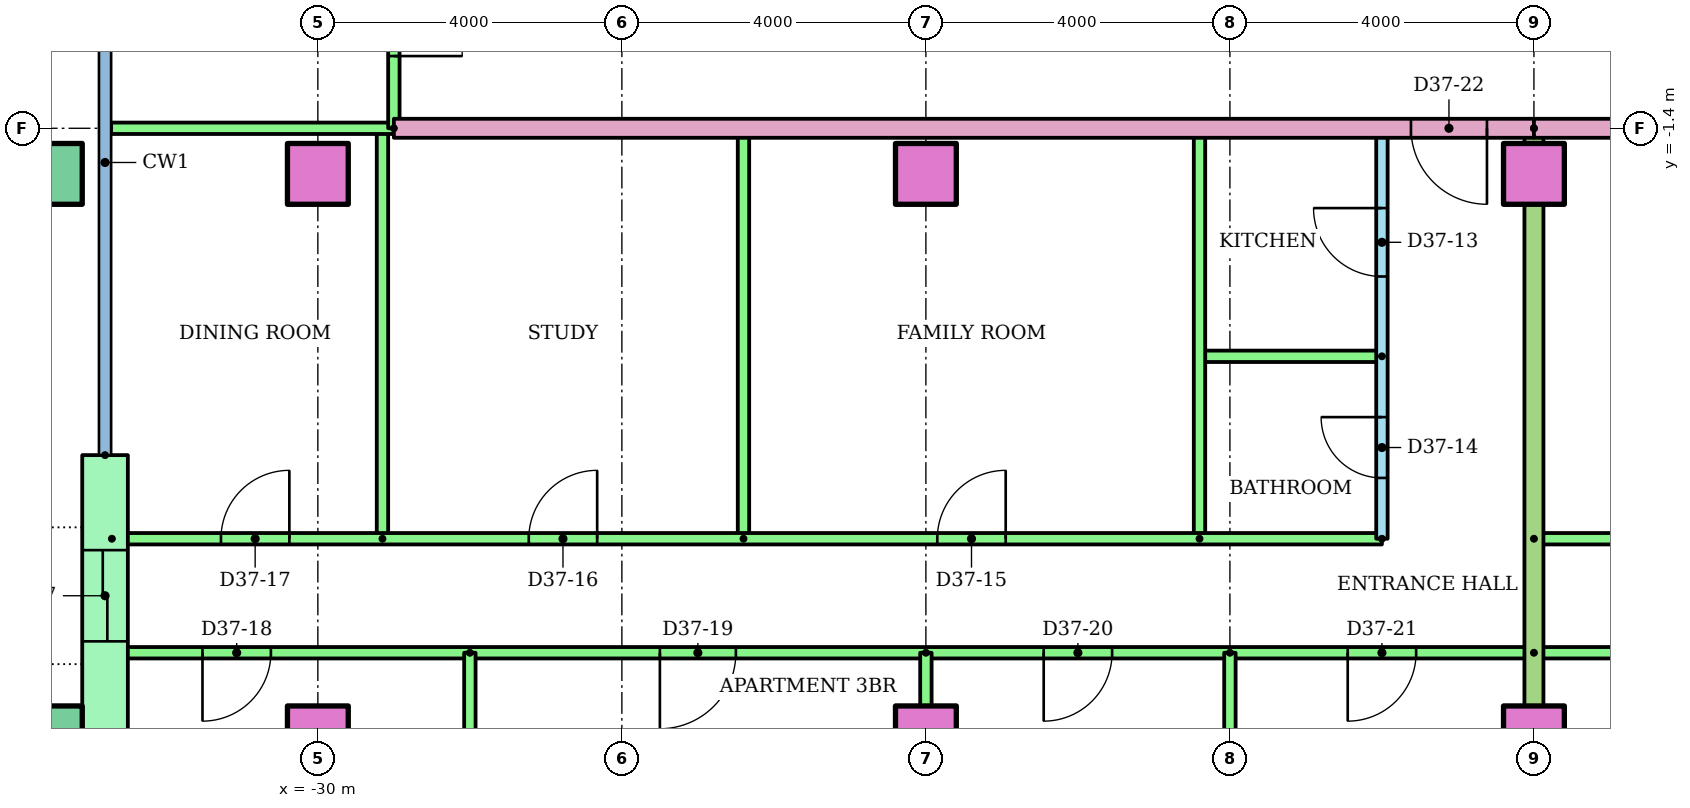
"""IFC4 building model, lengths in metres.
Left out: names, types, materials, properties, quantities, classifications, styles, units other than length and angle.
Written with IfcOpenShell. Run it as: python <this file> out.ifc"""

import sys

from ifc_helpers import new_model, si_unit, direction, frame, frame_2d, origin, origin_2d, place, context, subcontext, project, spatial, rectangle, hollow_rectangle, extrude, element, fill, save


model = new_model("IFC4")
c1 = context("Model", 3, precision=1e-05, world=origin(), true_north=direction((0.0, 1.0)))
c2 = subcontext(c1, "Body", "Model", "MODEL_VIEW")
j1 = project(units=[si_unit("LENGTHUNIT", "METRE"), si_unit("PLANEANGLEUNIT", "RADIAN")], contexts=[c1])
p1 = place(None, origin())
s1 = spatial("IfcSite", under=j1, at=p1, CompositionType="ELEMENT")
p2 = place(p1, origin())
s2 = spatial("IfcBuilding", under=s1, at=p2, CompositionType="ELEMENT")
p3 = place(p2, frame((0.0, 0.0, 142.2)))
s3 = spatial("IfcBuildingStorey", under=s2, at=p3, CompositionType="ELEMENT", Elevation=142.2)
p4 = place(p3, frame((-33.5, -9.4, 0.0)))
e1 = element("IfcColumn", 1, at=p4, inside=s3, PredefinedType="COLUMN", context=c2, shape_type="SweptSolid", body=[
    extrude(hollow_rectangle(XDim=0.8, YDim=0.8, WallThickness=0.04, at=origin_2d()), origin(), (0.0, 0.0, 1.0), 3.2),
])
for number, where in (
    (2, (-30.0, -9.4, 0.0)),
    (3, (-22.0, -9.4, 0.0)),
    (4, (-14.0, -9.4, 0.0)),
):
    element("IfcColumn", number, at=place(p3, frame(where)), inside=s3, PredefinedType="COLUMN", context=c2, shape_type="SweptSolid", body=[
        extrude(rectangle(XDim=0.8, YDim=0.8, at=origin_2d()), origin(), (0.0, 0.0, 1.0), 3.2),
    ])
p5 = place(p3, frame((-33.5, -2.0, 0.0)))
e5 = element("IfcColumn", 5, at=p5, inside=s3, PredefinedType="COLUMN", context=c2, shape_type="SweptSolid", body=[
    extrude(hollow_rectangle(XDim=0.8, YDim=0.8, WallThickness=0.04, at=origin_2d()), origin(), (0.0, 0.0, 1.0), 3.2),
])
for number, where in (
    (6, (-30.0, -2.0, 0.0)),
    (7, (-22.0, -2.0, 0.0)),
    (8, (-14.0, -2.0, 0.0)),
):
    element("IfcColumn", number, at=place(p3, frame(where)), inside=s3, PredefinedType="COLUMN", context=c2, shape_type="SweptSolid", body=[
        extrude(rectangle(XDim=0.8, YDim=0.8, at=origin_2d()), origin(), (0.0, 0.0, 1.0), 3.2),
    ])
p6 = place(p3, frame((-32.8, -5.7, 0.0), z_axis=(0.0, 0.0, 1.0), x_axis=(0.0, -1.0, 0.0)))
e9 = element("IfcWall", 9, at=p6, inside=s3, PredefinedType="STANDARD", context=c2, shape_type="SweptSolid", body=[
    extrude(rectangle(XDim=3.7, YDim=0.6, at=frame_2d((1.85, 0.0))), origin(), (0.0, 0.0, 1.0), 2.92),
])
p7 = place(p6, frame((1.25, 0.0, 0.0)))
e10 = element("IfcOpeningElement", 10, at=p7, cuts=e9, PredefinedType="OPENING", context=c2, shape_type="SweptSolid", body=[
    extrude(rectangle(XDim=1.2, YDim=2.1, at=frame_2d((0.6, 1.05))), frame((0.0, 0.31, 0.0), z_axis=(0.0, -1.0, 0.0), x_axis=(1.0, 0.0, 0.0)), (0.0, 0.0, 1.0), 0.62),
])
p8 = place(p3, frame((-16.0, -6.8, 0.0), z_axis=(0.0, 0.0, 1.0), x_axis=(0.0, 1.0, 0.0)))
e11 = element("IfcWall", 11, at=p8, inside=s3, PredefinedType="PARTITIONING", context=c2, shape_type="SweptSolid", body=[
    extrude(rectangle(XDim=5.4, YDim=0.15, at=frame_2d((2.7, 0.0))), origin(), (0.0, 0.0, 1.0), 2.4),
])
p9 = place(p8, frame((3.45, 0.0, 0.0)))
e12 = element("IfcOpeningElement", 12, at=p9, cuts=e11, PredefinedType="OPENING", context=c2, shape_type="SweptSolid", body=[
    extrude(rectangle(XDim=0.9, YDim=2.1, at=frame_2d((0.45, 1.05))), frame((0.0, 0.085, 0.0), z_axis=(0.0, -1.0, 0.0), x_axis=(1.0, 0.0, 0.0)), (0.0, 0.0, 1.0), 0.17),
])
p10 = place(p8, frame((0.8, 0.0, 0.0)))
e13 = element("IfcOpeningElement", 13, at=p10, cuts=e11, PredefinedType="OPENING", context=c2, shape_type="SweptSolid", body=[
    extrude(rectangle(XDim=0.8, YDim=2.1, at=frame_2d((0.4, 1.05))), frame((0.0, 0.085, 0.0), z_axis=(0.0, -1.0, 0.0), x_axis=(1.0, 0.0, 0.0)), (0.0, 0.0, 1.0), 0.17),
])
p11 = place(p3, frame((-16.0, -4.4, 0.0), z_axis=(0.0, 0.0, 1.0), x_axis=(-1.0, 0.0, 0.0)))
e14 = element("IfcWall", 14, at=p11, inside=s3, PredefinedType="PARTITIONING", context=c2, shape_type="SweptSolid", body=[
    extrude(rectangle(XDim=2.4, YDim=0.15, at=frame_2d((1.2, 0.0))), origin(), (0.0, 0.0, 1.0), 2.4),
])
for number, where, z_axis, x_axis in (
    (15, (-18.4, -6.8, 0.0), (0.0, 0.0, 1.0), (0.0, 1.0, 0.0)),
    (16, (-24.4, -6.8, 0.0), (0.0, 0.0, 1.0), (0.0, 1.0, 0.0)),
    (17, (-29.15, -6.8, 0.0), (0.0, 0.0, 1.0), (0.0, 1.0, 0.0)),
):
    element("IfcWall", number, at=place(p3, frame(where, z_axis=z_axis, x_axis=x_axis)), inside=s3, PredefinedType="PARTITIONING", context=c2, shape_type="SweptSolid", body=[
        extrude(rectangle(XDim=5.4, YDim=0.15, at=frame_2d((2.7, 0.0))), origin(), (0.0, 0.0, 1.0), 2.4),
    ])
p12 = place(p3, frame((-32.71, -6.8, 0.0)))
e18 = element("IfcWall", 18, at=p12, inside=s3, PredefinedType="PARTITIONING", context=c2, shape_type="SweptSolid", body=[
    extrude(rectangle(XDim=16.71, YDim=0.15, at=frame_2d((8.355, 0.0))), origin(), (0.0, 0.0, 1.0), 2.4),
])
p13 = place(p12, frame((10.86, 0.0, 0.0)))
e19 = element("IfcOpeningElement", 19, at=p13, cuts=e18, PredefinedType="OPENING", context=c2, shape_type="SweptSolid", body=[
    extrude(rectangle(XDim=0.9, YDim=2.1, at=frame_2d((0.45, 1.05))), frame((0.0, 0.085, 0.0), z_axis=(0.0, -1.0, 0.0), x_axis=(1.0, 0.0, 0.0)), (0.0, 0.0, 1.0), 0.17),
])
p14 = place(p12, frame((5.485, 0.0, 0.0)))
e20 = element("IfcOpeningElement", 20, at=p14, cuts=e18, PredefinedType="OPENING", context=c2, shape_type="SweptSolid", body=[
    extrude(rectangle(XDim=0.9, YDim=2.1, at=frame_2d((0.45, 1.05))), frame((0.0, 0.085, 0.0), z_axis=(0.0, -1.0, 0.0), x_axis=(1.0, 0.0, 0.0)), (0.0, 0.0, 1.0), 0.17),
])
p15 = place(p12, frame((1.435, 0.0, 0.0)))
e21 = element("IfcOpeningElement", 21, at=p15, cuts=e18, PredefinedType="OPENING", context=c2, shape_type="SweptSolid", body=[
    extrude(rectangle(XDim=0.9, YDim=2.1, at=frame_2d((0.45, 1.05))), frame((0.0, 0.085, 0.0), z_axis=(0.0, -1.0, 0.0), x_axis=(1.0, 0.0, 0.0)), (0.0, 0.0, 1.0), 0.17),
])
p16 = place(p3, frame((-14.0, -8.3, 0.0), z_axis=(0.0, 0.0, 1.0), x_axis=(-1.0, 0.0, 0.0)))
e22 = element("IfcWall", 22, at=p16, inside=s3, PredefinedType="PARTITIONING", context=c2, shape_type="SweptSolid", body=[
    extrude(rectangle(XDim=18.71, YDim=0.15, at=frame_2d((9.355, 0.0))), origin(), (0.0, 0.0, 1.0), 2.4),
])
p17 = place(p16, frame((16.618, 0.0, 0.0)))
e23 = element("IfcOpeningElement", 23, at=p17, cuts=e22, PredefinedType="OPENING", context=c2, shape_type="SweptSolid", body=[
    extrude(rectangle(XDim=0.9, YDim=2.1, at=frame_2d((0.45, 1.05))), frame((0.0, 0.085, 0.0), z_axis=(0.0, -1.0, 0.0), x_axis=(1.0, 0.0, 0.0)), (0.0, 0.0, 1.0), 0.17),
])
p18 = place(p16, frame((10.5, 0.0, 0.0)))
e24 = element("IfcOpeningElement", 24, at=p18, cuts=e22, PredefinedType="OPENING", context=c2, shape_type="SweptSolid", body=[
    extrude(rectangle(XDim=1.0, YDim=2.1, at=frame_2d((0.5, 1.05))), frame((0.0, 0.085, 0.0), z_axis=(0.0, -1.0, 0.0), x_axis=(1.0, 0.0, 0.0)), (0.0, 0.0, 1.0), 0.17),
])
p19 = place(p16, frame((5.55, 0.0, 0.0)))
e25 = element("IfcOpeningElement", 25, at=p19, cuts=e22, PredefinedType="OPENING", context=c2, shape_type="SweptSolid", body=[
    extrude(rectangle(XDim=0.9, YDim=2.1, at=frame_2d((0.45, 1.05))), frame((0.0, 0.085, 0.0), z_axis=(0.0, -1.0, 0.0), x_axis=(1.0, 0.0, 0.0)), (0.0, 0.0, 1.0), 0.17),
])
p20 = place(p16, frame((1.55, 0.0, 0.0)))
e26 = element("IfcOpeningElement", 26, at=p20, cuts=e22, PredefinedType="OPENING", context=c2, shape_type="SweptSolid", body=[
    extrude(rectangle(XDim=0.9, YDim=2.1, at=frame_2d((0.45, 1.05))), frame((0.0, 0.085, 0.0), z_axis=(0.0, -1.0, 0.0), x_axis=(1.0, 0.0, 0.0)), (0.0, 0.0, 1.0), 0.17),
])
p21 = place(p3, frame((-28.0, -8.3, 0.0), z_axis=(0.0, 0.0, 1.0), x_axis=(0.0, -1.0, 0.0)))
e27 = element("IfcWall", 27, at=p21, inside=s3, PredefinedType="PARTITIONING", context=c2, shape_type="SweptSolid", body=[
    extrude(rectangle(XDim=6.22, YDim=0.15, at=frame_2d((3.11, 0.0))), origin(), (0.0, 0.0, 1.0), 2.4),
])
p22 = place(p3, frame((-22.0, -8.3, 0.0), z_axis=(0.0, 0.0, 1.0), x_axis=(0.0, -1.0, 0.0)))
e28 = element("IfcWall", 28, at=p22, inside=s3, PredefinedType="PARTITIONING", context=c2, shape_type="SweptSolid", body=[
    extrude(rectangle(XDim=8.01, YDim=0.15, at=frame_2d((4.005, 0.0))), origin(), (0.0, 0.0, 1.0), 2.4),
])
p23 = place(p3, frame((-18.0, -8.3, 0.0), z_axis=(0.0, 0.0, 1.0), x_axis=(0.0, -1.0, 0.0)))
e29 = element("IfcWall", 29, at=p23, inside=s3, PredefinedType="PARTITIONING", context=c2, shape_type="SweptSolid", body=[
    extrude(rectangle(XDim=8.021, YDim=0.15, at=frame_2d((4.01, 0.0))), origin(), (0.0, 0.0, 1.0), 2.4),
])
p24 = place(p3, frame((-14.0, -6.8, 0.0)))
e30 = element("IfcWall", 30, at=p24, inside=s3, PredefinedType="PARTITIONING", context=c2, shape_type="SweptSolid", body=[
    extrude(rectangle(XDim=22.0, YDim=0.15, at=frame_2d((11.0, 0.0))), origin(), (0.0, 0.0, 1.0), 2.4),
])
p25 = place(p24, frame((15.025, 0.0, 0.0)))
e31 = element("IfcOpeningElement", 31, at=p25, cuts=e30, PredefinedType="OPENING", context=c2, shape_type="SweptSolid", body=[
    extrude(rectangle(XDim=0.9, YDim=2.1, at=frame_2d((0.45, 1.05))), frame((0.0, 0.085, 0.0), z_axis=(0.0, -1.0, 0.0), x_axis=(1.0, 0.0, 0.0)), (0.0, 0.0, 1.0), 0.17),
])
p26 = place(p24, frame((7.65, 0.0, 0.0)))
e32 = element("IfcOpeningElement", 32, at=p26, cuts=e30, PredefinedType="OPENING", context=c2, shape_type="SweptSolid", body=[
    extrude(rectangle(XDim=0.9, YDim=2.1, at=frame_2d((0.45, 1.05))), frame((0.0, 0.085, 0.0), z_axis=(0.0, -1.0, 0.0), x_axis=(1.0, 0.0, 0.0)), (0.0, 0.0, 1.0), 0.17),
])
p27 = place(p24, frame((1.975, 0.0, 0.0)))
e33 = element("IfcOpeningElement", 33, at=p27, cuts=e30, PredefinedType="OPENING", context=c2, shape_type="SweptSolid", body=[
    extrude(rectangle(XDim=0.9, YDim=2.1, at=frame_2d((0.45, 1.05))), frame((0.0, 0.085, 0.0), z_axis=(0.0, -1.0, 0.0), x_axis=(1.0, 0.0, 0.0)), (0.0, 0.0, 1.0), 0.17),
])
p28 = place(p3, frame((10.0, -8.3, 0.0), z_axis=(0.0, 0.0, 1.0), x_axis=(-1.0, 0.0, 0.0)))
e34 = element("IfcWall", 34, at=p28, inside=s3, PredefinedType="PARTITIONING", context=c2, shape_type="SweptSolid", body=[
    extrude(rectangle(XDim=24.0, YDim=0.15, at=frame_2d((12.0, 0.0))), origin(), (0.0, 0.0, 1.0), 2.4),
])
p29 = place(p28, frame((19.5, 0.0, 0.0)))
e35 = element("IfcOpeningElement", 35, at=p29, cuts=e34, PredefinedType="OPENING", context=c2, shape_type="SweptSolid", body=[
    extrude(rectangle(XDim=1.0, YDim=2.1, at=frame_2d((0.5, 1.05))), frame((0.0, 0.085, 0.0), z_axis=(0.0, -1.0, 0.0), x_axis=(1.0, 0.0, 0.0)), (0.0, 0.0, 1.0), 0.17),
])
p30 = place(p28, frame((13.55, 0.0, 0.0)))
e36 = element("IfcOpeningElement", 36, at=p30, cuts=e34, PredefinedType="OPENING", context=c2, shape_type="SweptSolid", body=[
    extrude(rectangle(XDim=0.9, YDim=2.1, at=frame_2d((0.45, 1.05))), frame((0.0, 0.085, 0.0), z_axis=(0.0, -1.0, 0.0), x_axis=(1.0, 0.0, 0.0)), (0.0, 0.0, 1.0), 0.17),
])
p31 = place(p28, frame((9.55, 0.0, 0.0)))
e37 = element("IfcOpeningElement", 37, at=p31, cuts=e34, PredefinedType="OPENING", context=c2, shape_type="SweptSolid", body=[
    extrude(rectangle(XDim=0.9, YDim=2.1, at=frame_2d((0.45, 1.05))), frame((0.0, 0.085, 0.0), z_axis=(0.0, -1.0, 0.0), x_axis=(1.0, 0.0, 0.0)), (0.0, 0.0, 1.0), 0.17),
])
p32 = place(p28, frame((5.55, 0.0, 0.0)))
e38 = element("IfcOpeningElement", 38, at=p32, cuts=e34, PredefinedType="OPENING", context=c2, shape_type="SweptSolid", body=[
    extrude(rectangle(XDim=0.9, YDim=2.1, at=frame_2d((0.45, 1.05))), frame((0.0, 0.085, 0.0), z_axis=(0.0, -1.0, 0.0), x_axis=(1.0, 0.0, 0.0)), (0.0, 0.0, 1.0), 0.17),
])
p33 = place(p28, frame((1.55, 0.0, 0.0)))
e39 = element("IfcOpeningElement", 39, at=p33, cuts=e34, PredefinedType="OPENING", context=c2, shape_type="SweptSolid", body=[
    extrude(rectangle(XDim=0.9, YDim=2.1, at=frame_2d((0.45, 1.05))), frame((0.0, 0.085, 0.0), z_axis=(0.0, -1.0, 0.0), x_axis=(1.0, 0.0, 0.0)), (0.0, 0.0, 1.0), 0.17),
])
p34 = place(p3, frame((-14.0, -1.4, 0.0), z_axis=(0.0, 0.0, 1.0), x_axis=(0.0, -1.0, 0.0)))
e40 = element("IfcWall", 40, at=p34, inside=s3, PredefinedType="PARTITIONING", context=c2, shape_type="SweptSolid", body=[
    extrude(rectangle(XDim=14.91, YDim=0.25, at=frame_2d((7.455, 0.0))), origin(), (0.0, 0.0, 1.0), 2.4),
])
p35 = place(p3, frame((-14.0, -1.4, 0.0), z_axis=(0.0, 0.0, 1.0), x_axis=(-1.0, 0.0, 0.0)))
e41 = element("IfcWall", 41, at=p35, inside=s3, PredefinedType="PARTITIONING", context=c2, shape_type="SweptSolid", body=[
    extrude(rectangle(XDim=15.0, YDim=0.25, at=frame_2d((7.5, 0.0))), origin(), (0.0, 0.0, 1.0), 2.4),
])
p36 = place(p35, frame((0.618, 0.0, 0.0)))
e42 = element("IfcOpeningElement", 42, at=p36, cuts=e41, PredefinedType="OPENING", context=c2, shape_type="SweptSolid", body=[
    extrude(rectangle(XDim=1.0, YDim=2.1, at=frame_2d((0.5, 1.05))), frame((0.0, 0.135, 0.0), z_axis=(0.0, -1.0, 0.0), x_axis=(1.0, 0.0, 0.0)), (0.0, 0.0, 1.0), 0.27),
])
p37 = place(p3, frame((-29.0, -1.4, 0.0), z_axis=(0.0, 0.0, 1.0), x_axis=(-1.0, 0.0, 0.0)))
e43 = element("IfcWall", 43, at=p37, inside=s3, PredefinedType="PARTITIONING", context=c2, shape_type="SweptSolid", body=[
    extrude(rectangle(XDim=3.72, YDim=0.15, at=frame_2d((1.86, 0.0))), origin(), (0.0, 0.0, 1.0), 2.4),
])
p38 = place(p3, frame((-29.0, 1.4, 0.0), z_axis=(0.0, 0.0, 1.0), x_axis=(0.0, -1.0, 0.0)))
e44 = element("IfcWall", 44, at=p38, inside=s3, PredefinedType="PARTITIONING", context=c2, shape_type="SweptSolid", body=[
    extrude(rectangle(XDim=2.8, YDim=0.15, at=frame_2d((1.4, 0.0))), origin(), (0.0, 0.0, 1.0), 2.4),
])
p39 = place(p38, frame((0.95, 0.0, 0.0)))
e45 = element("IfcOpeningElement", 45, at=p39, cuts=e44, PredefinedType="OPENING", context=c2, shape_type="SweptSolid", body=[
    extrude(rectangle(XDim=0.9, YDim=2.1, at=frame_2d((0.45, 1.05))), frame((0.0, 0.085, 0.0), z_axis=(0.0, -1.0, 0.0), x_axis=(1.0, 0.0, 0.0)), (0.0, 0.0, 1.0), 0.17),
])
p40 = place(p3, frame((14.0, -1.4, 0.0), z_axis=(0.0, 0.0, 1.0), x_axis=(-1.0, 0.0, 0.0)))
e46 = element("IfcWall", 46, at=p40, inside=s3, PredefinedType="PARTITIONING", context=c2, shape_type="SweptSolid", body=[
    extrude(rectangle(XDim=28.0, YDim=0.25, at=frame_2d((14.0, 0.0))), origin(), (0.0, 0.0, 1.0), 2.4),
])
p41 = place(p40, frame((4.618, 0.0, 0.0)))
e47 = element("IfcOpeningElement", 47, at=p41, cuts=e46, PredefinedType="OPENING", context=c2, shape_type="SweptSolid", body=[
    extrude(rectangle(XDim=1.0, YDim=2.1, at=frame_2d((0.5, 1.05))), frame((0.0, 0.135, 0.0), z_axis=(0.0, -1.0, 0.0), x_axis=(1.0, 0.0, 0.0)), (0.0, 0.0, 1.0), 0.27),
])
p42 = place(p40, frame((2.382, 0.0, 0.0)))
e48 = element("IfcOpeningElement", 48, at=p42, cuts=e46, PredefinedType="OPENING", context=c2, shape_type="SweptSolid", body=[
    extrude(rectangle(XDim=1.0, YDim=2.1, at=frame_2d((0.5, 1.05))), frame((0.0, 0.135, 0.0), z_axis=(0.0, -1.0, 0.0), x_axis=(1.0, 0.0, 0.0)), (0.0, 0.0, 1.0), 0.27),
])
p43 = place(p9, origin())
e49 = element("IfcDoor", 49, at=p43, inside=s3, OperationType="SINGLE_SWING_RIGHT", PredefinedType="DOOR", context=c2, shape_type="SweptSolid", body=[
    extrude(rectangle(XDim=0.9, YDim=2.1, at=frame_2d((0.45, 1.05))), frame((0.0, 0.025, 0.0), z_axis=(0.0, -1.0, 0.0), x_axis=(1.0, 0.0, 0.0)), (0.0, 0.0, 1.0), 0.05),
])
fill(e12, e49)
p44 = place(p10, origin())
e50 = element("IfcDoor", 50, at=p44, inside=s3, OperationType="SINGLE_SWING_RIGHT", PredefinedType="DOOR", context=c2, shape_type="SweptSolid", body=[
    extrude(rectangle(XDim=0.8, YDim=2.1, at=frame_2d((0.4, 1.05))), frame((0.0, 0.025, 0.0), z_axis=(0.0, -1.0, 0.0), x_axis=(1.0, 0.0, 0.0)), (0.0, 0.0, 1.0), 0.05),
])
fill(e13, e50)
p45 = place(p13, origin())
e51 = element("IfcDoor", 51, at=p45, inside=s3, OperationType="SINGLE_SWING_RIGHT", PredefinedType="DOOR", context=c2, shape_type="SweptSolid", body=[
    extrude(rectangle(XDim=0.9, YDim=2.1, at=frame_2d((0.45, 1.05))), frame((0.0, 0.025, 0.0), z_axis=(0.0, -1.0, 0.0), x_axis=(1.0, 0.0, 0.0)), (0.0, 0.0, 1.0), 0.05),
])
fill(e19, e51)
p46 = place(p14, origin())
e52 = element("IfcDoor", 52, at=p46, inside=s3, OperationType="SINGLE_SWING_RIGHT", PredefinedType="DOOR", context=c2, shape_type="SweptSolid", body=[
    extrude(rectangle(XDim=0.9, YDim=2.1, at=frame_2d((0.45, 1.05))), frame((0.0, 0.025, 0.0), z_axis=(0.0, -1.0, 0.0), x_axis=(1.0, 0.0, 0.0)), (0.0, 0.0, 1.0), 0.05),
])
fill(e20, e52)
p47 = place(p15, origin())
e53 = element("IfcDoor", 53, at=p47, inside=s3, OperationType="SINGLE_SWING_RIGHT", PredefinedType="DOOR", context=c2, shape_type="SweptSolid", body=[
    extrude(rectangle(XDim=0.9, YDim=2.1, at=frame_2d((0.45, 1.05))), frame((0.0, 0.025, 0.0), z_axis=(0.0, -1.0, 0.0), x_axis=(1.0, 0.0, 0.0)), (0.0, 0.0, 1.0), 0.05),
])
fill(e21, e53)
p48 = place(p17, origin())
e54 = element("IfcDoor", 54, at=p48, inside=s3, OperationType="SINGLE_SWING_RIGHT", PredefinedType="DOOR", context=c2, shape_type="SweptSolid", body=[
    extrude(rectangle(XDim=0.9, YDim=2.1, at=frame_2d((0.45, 1.05))), frame((0.0, 0.025, 0.0), z_axis=(0.0, -1.0, 0.0), x_axis=(1.0, 0.0, 0.0)), (0.0, 0.0, 1.0), 0.05),
])
fill(e23, e54)
p49 = place(p18, origin())
e55 = element("IfcDoor", 55, at=p49, inside=s3, OperationType="SINGLE_SWING_RIGHT", PredefinedType="DOOR", context=c2, shape_type="SweptSolid", body=[
    extrude(rectangle(XDim=1.0, YDim=2.1, at=frame_2d((0.5, 1.05))), frame((0.0, 0.025, 0.0), z_axis=(0.0, -1.0, 0.0), x_axis=(1.0, 0.0, 0.0)), (0.0, 0.0, 1.0), 0.05),
])
fill(e24, e55)
p50 = place(p19, origin())
e56 = element("IfcDoor", 56, at=p50, inside=s3, OperationType="SINGLE_SWING_RIGHT", PredefinedType="DOOR", context=c2, shape_type="SweptSolid", body=[
    extrude(rectangle(XDim=0.9, YDim=2.1, at=frame_2d((0.45, 1.05))), frame((0.0, 0.025, 0.0), z_axis=(0.0, -1.0, 0.0), x_axis=(1.0, 0.0, 0.0)), (0.0, 0.0, 1.0), 0.05),
])
fill(e25, e56)
p51 = place(p20, origin())
e57 = element("IfcDoor", 57, at=p51, inside=s3, OperationType="SINGLE_SWING_RIGHT", PredefinedType="DOOR", context=c2, shape_type="SweptSolid", body=[
    extrude(rectangle(XDim=0.9, YDim=2.1, at=frame_2d((0.45, 1.05))), frame((0.0, 0.025, 0.0), z_axis=(0.0, -1.0, 0.0), x_axis=(1.0, 0.0, 0.0)), (0.0, 0.0, 1.0), 0.05),
])
fill(e26, e57)
p52 = place(p36, origin())
e58 = element("IfcDoor", 58, at=p52, inside=s3, OperationType="SINGLE_SWING_LEFT", PredefinedType="DOOR", context=c2, shape_type="SweptSolid", body=[
    extrude(rectangle(XDim=1.0, YDim=2.1, at=frame_2d((0.5, 1.05))), frame((0.0, 0.025, 0.0), z_axis=(0.0, -1.0, 0.0), x_axis=(1.0, 0.0, 0.0)), (0.0, 0.0, 1.0), 0.05),
])
fill(e42, e58)
p53 = place(p39, origin())
e59 = element("IfcDoor", 59, at=p53, inside=s3, OperationType="SINGLE_SWING_RIGHT", PredefinedType="DOOR", context=c2, shape_type="SweptSolid", body=[
    extrude(rectangle(XDim=0.9, YDim=2.1, at=frame_2d((0.45, 1.05))), frame((0.0, 0.025, 0.0), z_axis=(0.0, -1.0, 0.0), x_axis=(1.0, 0.0, 0.0)), (0.0, 0.0, 1.0), 0.05),
])
fill(e45, e59)
p54 = place(p7, origin())
e60 = element("IfcDoor", 60, at=p54, inside=s3, OperationType="SLIDING_TO_LEFT", PredefinedType="DOOR", context=c2, shape_type="SweptSolid", body=[
    extrude(rectangle(XDim=1.2, YDim=2.1, at=frame_2d((0.6, 1.05))), frame((0.0, 0.025, 0.0), z_axis=(0.0, -1.0, 0.0), x_axis=(1.0, 0.0, 0.0)), (0.0, 0.0, 1.0), 0.05),
])
fill(e10, e60)
save(model, sys.argv[1])
